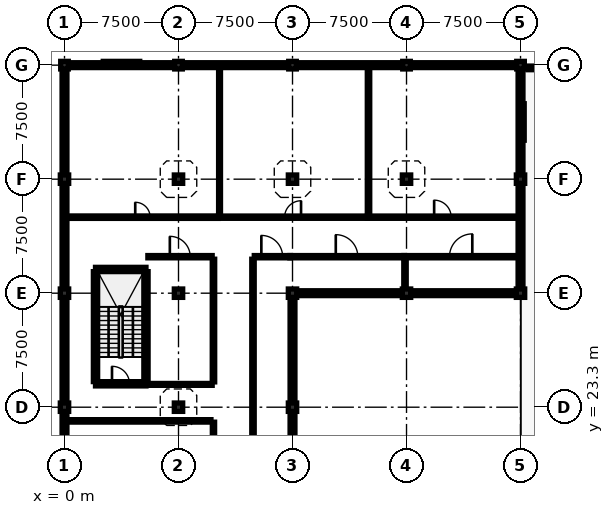
"""IFC4 building model, lengths in metres.
Left out: names, types, materials, properties, quantities, classifications, styles, units other than length and angle.
Written with IfcOpenShell. Run it as: python <this file> out.ifc"""

import sys

from ifc_helpers import new_model, si_unit, direction, frame, frame_2d, origin, origin_2d, place, context, subcontext, project, spatial, rectangle, extrude, element, fill, save


model = new_model("IFC4")
c1 = context("Model", 3, precision=1e-05, world=origin(), true_north=direction((0.0, 1.0)))
c2 = subcontext(c1, "Body", "Model", "MODEL_VIEW")
j1 = project(units=[si_unit("LENGTHUNIT", "METRE"), si_unit("PLANEANGLEUNIT", "RADIAN")], contexts=[c1])
p1 = place(None, origin())
s1 = spatial("IfcSite", under=j1, at=p1, CompositionType="ELEMENT")
p2 = place(p1, origin())
s2 = spatial("IfcBuilding", under=s1, at=p2, CompositionType="ELEMENT")
p3 = place(p2, frame((0.0, 0.0, 17.5)))
s3 = spatial("IfcBuildingStorey", under=s2, at=p3, CompositionType="ELEMENT", Elevation=17.5)
for number, where, z_axis, x_axis in (
    (1, (0.0, 23.3, 0.0), (0.0, 0.0, 1.0), (1.0, 0.0, 0.0)),
    (2, (0.0, 30.8, 0.0), (0.0, 0.0, 1.0), (1.0, 0.0, 0.0)),
    (3, (0.0, 38.3, 0.0), (0.0, 0.0, 1.0), (1.0, 0.0, 0.0)),
):
    element("IfcColumn", number, at=place(p3, frame(where, z_axis=z_axis, x_axis=x_axis)), inside=s3, PredefinedType="COLUMN", context=c2, shape_type="SweptSolid", body=[
        extrude(rectangle(XDim=0.55, YDim=0.55, at=origin_2d()), origin(), (0.0, 0.0, 1.0), 3.72),
    ])
p4 = place(p3, frame((0.0, 45.8, 0.0), z_axis=(0.0, 0.0, 1.0), x_axis=(1.0, 0.0, 0.0)))
e4 = element("IfcColumn", 4, at=p4, inside=s3, PredefinedType="COLUMN", context=c2, shape_type="SweptSolid", body=[
    extrude(rectangle(XDim=0.5, YDim=0.5, at=origin_2d()), origin(), (0.0, 0.0, 1.0), 5.156),
])
for number, where, z_axis, x_axis in (
    (5, (7.5, 23.3, 0.0), (0.0, 0.0, 1.0), (1.0, 0.0, 0.0)),
    (6, (7.5, 30.8, 0.0), (0.0, 0.0, 1.0), (1.0, 0.0, 0.0)),
    (7, (7.5, 38.3, 0.0), (0.0, 0.0, 1.0), (1.0, 0.0, 0.0)),
):
    element("IfcColumn", number, at=place(p3, frame(where, z_axis=z_axis, x_axis=x_axis)), inside=s3, PredefinedType="COLUMN", context=c2, shape_type="SweptSolid", body=[
        extrude(rectangle(XDim=0.55, YDim=0.55, at=origin_2d()), origin(), (0.0, 0.0, 1.0), 3.72),
    ])
p5 = place(p3, frame((7.5, 45.8, 0.0), z_axis=(0.0, 0.0, 1.0), x_axis=(1.0, 0.0, 0.0)))
e8 = element("IfcColumn", 8, at=p5, inside=s3, PredefinedType="COLUMN", context=c2, shape_type="SweptSolid", body=[
    extrude(rectangle(XDim=0.5, YDim=0.5, at=origin_2d()), origin(), (0.0, 0.0, 1.0), 5.156),
])
for number, where, z_axis, x_axis in (
    (9, (15.0, 23.3, 0.0), (0.0, 0.0, 1.0), (1.0, 0.0, 0.0)),
    (10, (15.0, 30.8, 0.0), (0.0, 0.0, 1.0), (1.0, 0.0, 0.0)),
    (11, (15.0, 38.3, 0.0), (0.0, 0.0, 1.0), (1.0, 0.0, 0.0)),
):
    element("IfcColumn", number, at=place(p3, frame(where, z_axis=z_axis, x_axis=x_axis)), inside=s3, PredefinedType="COLUMN", context=c2, shape_type="SweptSolid", body=[
        extrude(rectangle(XDim=0.55, YDim=0.55, at=origin_2d()), origin(), (0.0, 0.0, 1.0), 3.72),
    ])
p6 = place(p3, frame((15.0, 45.8, 0.0), z_axis=(0.0, 0.0, 1.0), x_axis=(1.0, 0.0, 0.0)))
e12 = element("IfcColumn", 12, at=p6, inside=s3, PredefinedType="COLUMN", context=c2, shape_type="SweptSolid", body=[
    extrude(rectangle(XDim=0.5, YDim=0.5, at=origin_2d()), origin(), (0.0, 0.0, 1.0), 3.72),
])
for number, where, z_axis, x_axis in (
    (13, (22.5, 30.8, 0.0), (0.0, 0.0, 1.0), (1.0, 0.0, 0.0)),
    (14, (22.5, 38.3, 0.0), (0.0, 0.0, 1.0), (1.0, 0.0, 0.0)),
):
    element("IfcColumn", number, at=place(p3, frame(where, z_axis=z_axis, x_axis=x_axis)), inside=s3, PredefinedType="COLUMN", context=c2, shape_type="SweptSolid", body=[
        extrude(rectangle(XDim=0.55, YDim=0.55, at=origin_2d()), origin(), (0.0, 0.0, 1.0), 3.75),
    ])
p7 = place(p3, frame((22.5, 45.8, 0.0), z_axis=(0.0, 0.0, 1.0), x_axis=(1.0, 0.0, 0.0)))
e15 = element("IfcColumn", 15, at=p7, inside=s3, PredefinedType="COLUMN", context=c2, shape_type="SweptSolid", body=[
    extrude(rectangle(XDim=0.5, YDim=0.5, at=origin_2d()), origin(), (0.0, 0.0, 1.0), 3.72),
])
for number, where, z_axis, x_axis in (
    (16, (30.0, 30.8, 0.0), (0.0, 0.0, 1.0), (1.0, 0.0, 0.0)),
    (17, (30.0, 38.3, 0.0), (0.0, 0.0, 1.0), (1.0, 0.0, 0.0)),
):
    element("IfcColumn", number, at=place(p3, frame(where, z_axis=z_axis, x_axis=x_axis)), inside=s3, PredefinedType="COLUMN", context=c2, shape_type="SweptSolid", body=[
        extrude(rectangle(XDim=0.55, YDim=0.55, at=origin_2d()), origin(), (0.0, 0.0, 1.0), 3.75),
    ])
p8 = place(p3, frame((30.0, 45.8, 0.0), z_axis=(0.0, 0.0, 1.0), x_axis=(1.0, 0.0, 0.0)))
e18 = element("IfcColumn", 18, at=p8, inside=s3, PredefinedType="COLUMN", context=c2, shape_type="SweptSolid", body=[
    extrude(rectangle(XDim=0.5, YDim=0.5, at=origin_2d()), origin(), (0.0, 0.0, 1.0), 3.72),
])
p9 = place(p3, frame((30.0, 45.55, 0.0), z_axis=(0.0, 0.0, 1.0), x_axis=(0.0, -1.0, 0.0)))
e19 = element("IfcWall", 19, at=p9, inside=s3, PredefinedType="SOLIDWALL", context=c2, shape_type="SweptSolid", body=[
    extrude(rectangle(XDim=6.975, YDim=0.32, at=frame_2d((3.488, 0.0))), origin(), (0.0, 0.0, 1.0), 3.085),
])
p10 = place(p3, frame((30.0, 38.025, 0.0), z_axis=(0.0, 0.0, 1.0), x_axis=(0.0, -1.0, 0.0)))
e20 = element("IfcWall", 20, at=p10, inside=s3, PredefinedType="SOLIDWALL", context=c2, shape_type="SweptSolid", body=[
    extrude(rectangle(XDim=6.95, YDim=0.32, at=frame_2d((3.475, 0.0))), origin(), (0.0, 0.0, 1.0), 3.085),
])
p11 = place(p3, frame((29.725, 30.8, 0.0), z_axis=(0.0, 0.0, 1.0), x_axis=(-1.0, 0.0, 0.0)))
e21 = element("IfcWall", 21, at=p11, inside=s3, PredefinedType="SOLIDWALL", context=c2, shape_type="SweptSolid", body=[
    extrude(rectangle(XDim=6.95, YDim=0.32, at=frame_2d((3.475, 0.0))), origin(), (0.0, 0.0, 1.0), 3.035),
])
p12 = place(p3, frame((22.225, 30.8, 0.0), z_axis=(0.0, 0.0, 1.0), x_axis=(-1.0, 0.0, 0.0)))
e22 = element("IfcWall", 22, at=p12, inside=s3, PredefinedType="SOLIDWALL", context=c2, shape_type="SweptSolid", body=[
    extrude(rectangle(XDim=6.95, YDim=0.32, at=frame_2d((3.475, 0.0))), origin(), (0.0, 0.0, 1.0), 3.005),
])
for number, where, z_axis, x_axis in (
    (23, (15.0, 30.525, 0.0), (0.0, 0.0, 1.0), (0.0, -1.0, 0.0)),
    (24, (15.0, 23.025, 0.0), (0.0, 0.0, 1.0), (0.0, -1.0, 0.0)),
    (25, (0.0, 16.075, 0.0), (0.0, 0.0, 1.0), (0.0, 1.0, 0.0)),
    (26, (0.0, 23.575, 0.0), (0.0, 0.0, 1.0), (0.0, 1.0, 0.0)),
):
    element("IfcWall", number, at=place(p3, frame(where, z_axis=z_axis, x_axis=x_axis)), inside=s3, PredefinedType="SOLIDWALL", context=c2, shape_type="SweptSolid", body=[
        extrude(rectangle(XDim=6.95, YDim=0.32, at=frame_2d((3.475, 0.0))), origin(), (0.0, 0.0, 1.0), 2.805),
    ])
p13 = place(p3, frame((0.0, 31.075, 0.0), z_axis=(0.0, 0.0, 1.0), x_axis=(0.0, 1.0, 0.0)))
e27 = element("IfcWall", 27, at=p13, inside=s3, PredefinedType="SOLIDWALL", context=c2, shape_type="SweptSolid", body=[
    extrude(rectangle(XDim=6.95, YDim=0.32, at=frame_2d((3.475, 0.0))), origin(), (0.0, 0.0, 1.0), 3.055),
])
p14 = place(p3, frame((0.0, 38.575, 0.0), z_axis=(0.0, 0.0, 1.0), x_axis=(0.0, 1.0, 0.0)))
e28 = element("IfcWall", 28, at=p14, inside=s3, PredefinedType="SOLIDWALL", context=c2, shape_type="SweptSolid", body=[
    extrude(rectangle(XDim=6.975, YDim=0.32, at=frame_2d((3.488, 0.0))), origin(), (0.0, 0.0, 1.0), 3.055),
])
p15 = place(p3, frame((0.25, 45.8, 0.0), z_axis=(0.0, 0.0, 1.0), x_axis=(1.0, 0.0, 0.0)))
e29 = element("IfcWall", 29, at=p15, inside=s3, PredefinedType="SOLIDWALL", context=c2, shape_type="SweptSolid", body=[
    extrude(rectangle(XDim=7.0, YDim=0.32, at=frame_2d((3.5, 0.0))), origin(), (0.0, 0.0, 1.0), 3.69),
])
p16 = place(p15, frame((2.8, 0.0, 0.9)))
e30 = element("IfcOpeningElement", 30, at=p16, cuts=e29, PredefinedType="OPENING", context=c2, shape_type="SweptSolid", body=[
    extrude(rectangle(XDim=1.4, YDim=1.9, at=frame_2d((0.7, 0.95))), frame((0.0, 0.172, 0.0), z_axis=(0.0, -1.0, 0.0), x_axis=(1.0, 0.0, 0.0)), (0.0, 0.0, 1.0), 0.344),
])
p17 = place(p3, frame((7.75, 45.8, 0.0), z_axis=(0.0, 0.0, 1.0), x_axis=(1.0, 0.0, 0.0)))
e31 = element("IfcWall", 31, at=p17, inside=s3, PredefinedType="SOLIDWALL", context=c2, shape_type="SweptSolid", body=[
    extrude(rectangle(XDim=7.0, YDim=0.32, at=frame_2d((3.5, 0.0))), origin(), (0.0, 0.0, 1.0), 3.69),
])
p18 = place(p3, frame((15.25, 45.8, 0.0), z_axis=(0.0, 0.0, 1.0), x_axis=(1.0, 0.0, 0.0)))
e32 = element("IfcWall", 32, at=p18, inside=s3, PredefinedType="SOLIDWALL", context=c2, shape_type="SweptSolid", body=[
    extrude(rectangle(XDim=7.0, YDim=0.32, at=frame_2d((3.5, 0.0))), origin(), (0.0, 0.0, 1.0), 3.7),
])
p19 = place(p3, frame((22.75, 45.8, 0.0), z_axis=(0.0, 0.0, 1.0), x_axis=(1.0, 0.0, 0.0)))
e33 = element("IfcWall", 33, at=p19, inside=s3, PredefinedType="SOLIDWALL", context=c2, shape_type="SweptSolid", body=[
    extrude(rectangle(XDim=7.0, YDim=0.32, at=frame_2d((3.5, 0.0))), origin(), (0.0, 0.0, 1.0), 3.7),
])
p20 = place(p19, frame((2.8, 0.0, 0.9)))
e34 = element("IfcOpeningElement", 34, at=p20, cuts=e33, PredefinedType="OPENING", context=c2, shape_type="SweptSolid", body=[
    extrude(rectangle(XDim=1.4, YDim=1.3, at=frame_2d((0.7, 0.65))), frame((0.0, 0.172, 0.0), z_axis=(0.0, -1.0, 0.0), x_axis=(1.0, 0.0, 0.0)), (0.0, 0.0, 1.0), 0.344),
])
p21 = place(p3, frame((30.5, 45.62, -0.08), z_axis=(0.0, 0.0, 1.0), x_axis=(1.0, 0.0, 0.0)))
e35 = element("IfcWall", 35, at=p21, inside=s3, PredefinedType="PARAPET", context=c2, shape_type="SweptSolid", body=[
    extrude(rectangle(XDim=6.52, YDim=0.24, at=frame_2d((3.26, 0.0))), origin(), (0.0, 0.0, 1.0), 0.6),
])
p22 = place(p3, frame((5.36, 24.985, 0.0), z_axis=(0.0, 0.0, 1.0), x_axis=(0.0, 1.0, 0.0)))
e36 = element("IfcWall", 36, at=p22, inside=s3, PredefinedType="SHEAR", context=c2, shape_type="SweptSolid", body=[
    extrude(rectangle(XDim=7.23, YDim=0.28, at=frame_2d((3.615, 0.0))), origin(), (0.0, 0.0, 1.0), 3.72),
])
p23 = place(p3, frame((5.36, 32.36, 0.0), z_axis=(0.0, 0.0, 1.0), x_axis=(-1.0, 0.0, 0.0)))
e37 = element("IfcWall", 37, at=p23, inside=s3, PredefinedType="SHEAR", context=c2, shape_type="SweptSolid", body=[
    extrude(rectangle(XDim=3.32, YDim=0.28, at=frame_2d((1.66, 0.0))), origin(), (0.0, 0.0, 1.0), 3.72),
])
p24 = place(p3, frame((2.04, 32.215, 0.0), z_axis=(0.0, 0.0, 1.0), x_axis=(0.0, -1.0, 0.0)))
e38 = element("IfcWall", 38, at=p24, inside=s3, PredefinedType="SHEAR", context=c2, shape_type="SweptSolid", body=[
    extrude(rectangle(XDim=7.23, YDim=0.28, at=frame_2d((3.615, 0.0))), origin(), (0.0, 0.0, 1.0), 3.72),
])
p25 = place(p3, frame((2.04, 24.84, 0.0), z_axis=(0.0, 0.0, 1.0), x_axis=(1.0, 0.0, 0.0)))
e39 = element("IfcWall", 39, at=p25, inside=s3, PredefinedType="SHEAR", context=c2, shape_type="SweptSolid", body=[
    extrude(rectangle(XDim=3.32, YDim=0.28, at=frame_2d((1.66, 0.0))), origin(), (0.0, 0.0, 1.0), 3.72),
])
p26 = place(p25, frame((1.085, 0.0, 0.0)))
e40 = element("IfcOpeningElement", 40, at=p26, cuts=e39, PredefinedType="OPENING", context=c2, shape_type="SweptSolid", body=[
    extrude(rectangle(XDim=1.15, YDim=2.15, at=frame_2d((0.575, 1.075))), frame((0.0, 0.152, 0.0), z_axis=(0.0, -1.0, 0.0), x_axis=(1.0, 0.0, 0.0)), (0.0, 0.0, 1.0), 0.304),
])
p27 = place(p3, frame((0.172, 35.8, 0.0), z_axis=(0.0, 0.0, 1.0), x_axis=(1.0, 0.0, 0.0)))
e41 = element("IfcWall", 41, at=p27, inside=s3, PredefinedType="PARTITIONING", context=c2, shape_type="SweptSolid", body=[
    extrude(rectangle(XDim=9.943, YDim=0.16, at=frame_2d((4.971, 0.0))), origin(), (0.0, 0.0, 1.0), 3.005),
])
p28 = place(p27, frame((4.481, 0.0, 0.0)))
e42 = element("IfcOpeningElement", 42, at=p28, cuts=e41, PredefinedType="OPENING", context=c2, shape_type="SweptSolid", body=[
    extrude(rectangle(XDim=0.98, YDim=2.12, at=frame_2d((0.49, 1.06))), frame((0.0, 0.092, 0.0), z_axis=(0.0, -1.0, 0.0), x_axis=(1.0, 0.0, 0.0)), (0.0, 0.0, 1.0), 0.184),
])
p29 = place(p3, frame((10.127, 35.8, 0.0), z_axis=(0.0, 0.0, 1.0), x_axis=(1.0, 0.0, 0.0)))
e43 = element("IfcWall", 43, at=p29, inside=s3, PredefinedType="PARTITIONING", context=c2, shape_type="SweptSolid", body=[
    extrude(rectangle(XDim=9.788, YDim=0.15, at=frame_2d((4.894, 0.0))), origin(), (0.0, 0.0, 1.0), 3.005),
])
p30 = place(p29, frame((4.354, 0.0, 0.0)))
e44 = element("IfcOpeningElement", 44, at=p30, cuts=e43, PredefinedType="OPENING", context=c2, shape_type="SweptSolid", body=[
    extrude(rectangle(XDim=1.08, YDim=2.18, at=frame_2d((0.54, 1.09))), frame((0.0, 0.087, 0.0), z_axis=(0.0, -1.0, 0.0), x_axis=(1.0, 0.0, 0.0)), (0.0, 0.0, 1.0), 0.174),
])
p31 = place(p3, frame((19.927, 35.8, 0.0), z_axis=(0.0, 0.0, 1.0), x_axis=(1.0, 0.0, 0.0)))
e45 = element("IfcWall", 45, at=p31, inside=s3, PredefinedType="PARTITIONING", context=c2, shape_type="SweptSolid", body=[
    extrude(rectangle(XDim=9.901, YDim=0.15, at=frame_2d((4.95, 0.0))), origin(), (0.0, 0.0, 1.0), 3.035),
])
p32 = place(p31, frame((4.39, 0.0, 0.0)))
e46 = element("IfcOpeningElement", 46, at=p32, cuts=e45, PredefinedType="OPENING", context=c2, shape_type="SweptSolid", body=[
    extrude(rectangle(XDim=1.12, YDim=2.2, at=frame_2d((0.56, 1.1))), frame((0.0, 0.087, 0.0), z_axis=(0.0, -1.0, 0.0), x_axis=(1.0, 0.0, 0.0)), (0.0, 0.0, 1.0), 0.174),
])
p33 = place(p3, frame((9.8, 15.127, 0.0), z_axis=(0.0, 0.0, 1.0), x_axis=(0.0, 1.0, 0.0)))
e47 = element("IfcWall", 47, at=p33, inside=s3, PredefinedType="PARTITIONING", context=c2, shape_type="SweptSolid", body=[
    extrude(rectangle(XDim=7.188, YDim=0.15, at=frame_2d((3.594, 0.0))), origin(), (0.0, 0.0, 1.0), 2.805),
])
p34 = place(p33, frame((2.954, 0.0, 0.0)))
e48 = element("IfcOpeningElement", 48, at=p34, cuts=e47, PredefinedType="OPENING", context=c2, shape_type="SweptSolid", body=[
    extrude(rectangle(XDim=1.28, YDim=2.22, at=frame_2d((0.64, 1.11))), frame((0.0, 0.087, 0.0), z_axis=(0.0, -1.0, 0.0), x_axis=(1.0, 0.0, 0.0)), (0.0, 0.0, 1.0), 0.174),
])
p35 = place(p3, frame((5.485, 33.2, 0.0), z_axis=(0.0, 0.0, 1.0), x_axis=(1.0, 0.0, 0.0)))
e49 = element("IfcWall", 49, at=p35, inside=s3, PredefinedType="PARTITIONING", context=c2, shape_type="SweptSolid", body=[
    extrude(rectangle(XDim=4.23, YDim=0.15, at=frame_2d((2.115, 0.0))), origin(), (0.0, 0.0, 1.0), 3.005),
])
p36 = place(p35, frame((1.445, 0.0, 0.0)))
e50 = element("IfcOpeningElement", 50, at=p36, cuts=e49, PredefinedType="OPENING", context=c2, shape_type="SweptSolid", body=[
    extrude(rectangle(XDim=1.34, YDim=2.24, at=frame_2d((0.67, 1.12))), frame((0.0, 0.087, 0.0), z_axis=(0.0, -1.0, 0.0), x_axis=(1.0, 0.0, 0.0)), (0.0, 0.0, 1.0), 0.174),
])
p37 = place(p3, frame((12.485, 33.2, 0.0), z_axis=(0.0, 0.0, 1.0), x_axis=(1.0, 0.0, 0.0)))
e51 = element("IfcWall", 51, at=p37, inside=s3, PredefinedType="PARTITIONING", context=c2, shape_type="SweptSolid", body=[
    extrude(rectangle(XDim=2.33, YDim=0.15, at=frame_2d((1.165, 0.0))), origin(), (0.0, 0.0, 1.0), 3.005),
])
p38 = place(p37, frame((0.465, 0.0, 0.0)))
e52 = element("IfcOpeningElement", 52, at=p38, cuts=e51, PredefinedType="OPENING", context=c2, shape_type="SweptSolid", body=[
    extrude(rectangle(XDim=1.4, YDim=2.25, at=frame_2d((0.7, 1.125))), frame((0.0, 0.087, 0.0), z_axis=(0.0, -1.0, 0.0), x_axis=(1.0, 0.0, 0.0)), (0.0, 0.0, 1.0), 0.174),
])
p39 = place(p3, frame((14.827, 33.2, 0.0), z_axis=(0.0, 0.0, 1.0), x_axis=(1.0, 0.0, 0.0)))
e53 = element("IfcWall", 53, at=p39, inside=s3, PredefinedType="PARTITIONING", context=c2, shape_type="SweptSolid", body=[
    extrude(rectangle(XDim=7.488, YDim=0.15, at=frame_2d((3.744, 0.0))), origin(), (0.0, 0.0, 1.0), 3.005),
])
p40 = place(p39, frame((3.019, 0.0, 0.0)))
e54 = element("IfcOpeningElement", 54, at=p40, cuts=e53, PredefinedType="OPENING", context=c2, shape_type="SweptSolid", body=[
    extrude(rectangle(XDim=1.45, YDim=2.26, at=frame_2d((0.725, 1.13))), frame((0.0, 0.087, 0.0), z_axis=(0.0, -1.0, 0.0), x_axis=(1.0, 0.0, 0.0)), (0.0, 0.0, 1.0), 0.174),
])
p41 = place(p3, frame((22.327, 33.2, 0.0), z_axis=(0.0, 0.0, 1.0), x_axis=(1.0, 0.0, 0.0)))
e55 = element("IfcWall", 55, at=p41, inside=s3, PredefinedType="PARTITIONING", context=c2, shape_type="SweptSolid", body=[
    extrude(rectangle(XDim=7.501, YDim=0.15, at=frame_2d((3.75, 0.0))), origin(), (0.0, 0.0, 1.0), 3.035),
])
p42 = place(p41, frame((3.0, 0.0, 0.0)))
e56 = element("IfcOpeningElement", 56, at=p42, cuts=e55, PredefinedType="OPENING", context=c2, shape_type="SweptSolid", body=[
    extrude(rectangle(XDim=1.5, YDim=2.28, at=frame_2d((0.75, 1.14))), frame((0.0, 0.087, 0.0), z_axis=(0.0, -1.0, 0.0), x_axis=(1.0, 0.0, 0.0)), (0.0, 0.0, 1.0), 0.174),
])
p43 = place(p3, frame((5.372, 24.8, 0.0), z_axis=(0.0, 0.0, 1.0), x_axis=(1.0, 0.0, 0.0)))
e57 = element("IfcWall", 57, at=p43, inside=s3, PredefinedType="PARTITIONING", context=c2, shape_type="SweptSolid", body=[
    extrude(rectangle(XDim=4.343, YDim=0.125, at=frame_2d((2.171, 0.0))), origin(), (0.0, 0.0, 1.0), 2.805),
])
p44 = place(p3, frame((10.2, 35.887, 0.0), z_axis=(0.0, 0.0, 1.0), x_axis=(0.0, 1.0, 0.0)))
e58 = element("IfcWall", 58, at=p44, inside=s3, PredefinedType="PARTITIONING", context=c2, shape_type="SweptSolid", body=[
    extrude(rectangle(XDim=9.741, YDim=0.125, at=frame_2d((4.871, 0.0))), origin(), (0.0, 0.0, 1.0), 3.055),
])
p45 = place(p3, frame((20.0, 35.887, 0.0), z_axis=(0.0, 0.0, 1.0), x_axis=(0.0, 1.0, 0.0)))
e59 = element("IfcWall", 59, at=p45, inside=s3, PredefinedType="PARTITIONING", context=c2, shape_type="SweptSolid", body=[
    extrude(rectangle(XDim=9.741, YDim=0.16, at=frame_2d((4.871, 0.0))), origin(), (0.0, 0.0, 1.0), 3.055),
])
p46 = place(p3, frame((0.172, 22.4, 0.0), z_axis=(0.0, 0.0, 1.0), x_axis=(1.0, 0.0, 0.0)))
e60 = element("IfcWall", 60, at=p46, inside=s3, PredefinedType="PARTITIONING", context=c2, shape_type="SweptSolid", body=[
    extrude(rectangle(XDim=9.463, YDim=0.16, at=frame_2d((4.731, 0.0))), origin(), (0.0, 0.0, 1.0), 2.805),
])
p47 = place(p3, frame((9.8, 24.965, 0.0), z_axis=(0.0, 0.0, 1.0), x_axis=(0.0, 1.0, 0.0)))
e61 = element("IfcWall", 61, at=p47, inside=s3, PredefinedType="PARTITIONING", context=c2, shape_type="SweptSolid", body=[
    extrude(rectangle(XDim=8.07, YDim=0.16, at=frame_2d((4.035, 0.0))), origin(), (0.0, 0.0, 1.0), 3.005),
])
p48 = place(p3, frame((12.4, 15.965, 0.0), z_axis=(0.0, 0.0, 1.0), x_axis=(0.0, 1.0, 0.0)))
e62 = element("IfcWall", 62, at=p48, inside=s3, PredefinedType="PARTITIONING", context=c2, shape_type="SweptSolid", body=[
    extrude(rectangle(XDim=17.07, YDim=0.16, at=frame_2d((8.535, 0.0))), origin(), (0.0, 0.0, 1.0), 2.805),
])
p49 = place(p3, frame((22.4, 31.087, 0.0), z_axis=(0.0, 0.0, 1.0), x_axis=(0.0, 1.0, 0.0)))
e63 = element("IfcWall", 63, at=p49, inside=s3, PredefinedType="PARTITIONING", context=c2, shape_type="SweptSolid", body=[
    extrude(rectangle(XDim=2.026, YDim=0.16, at=frame_2d((1.013, 0.0))), origin(), (0.0, 0.0, 1.0), 3.035),
])
p50 = place(p16, origin())
e64 = element("IfcWindow", 64, at=p50, inside=s3, PartitioningType="SINGLE_PANEL", PredefinedType="WINDOW", context=c2, shape_type="SweptSolid", body=[
    extrude(rectangle(XDim=1.4, YDim=1.9, at=frame_2d((0.7, 0.95))), frame((0.0, 0.03, 0.0), z_axis=(0.0, -1.0, 0.0), x_axis=(1.0, 0.0, 0.0)), (0.0, 0.0, 1.0), 0.06),
])
fill(e30, e64)
p51 = place(p20, origin())
e65 = element("IfcWindow", 65, at=p51, inside=s3, PartitioningType="SINGLE_PANEL", PredefinedType="WINDOW", context=c2, shape_type="SweptSolid", body=[
    extrude(rectangle(XDim=1.4, YDim=1.3, at=frame_2d((0.7, 0.65))), frame((0.0, 0.03, 0.0), z_axis=(0.0, -1.0, 0.0), x_axis=(1.0, 0.0, 0.0)), (0.0, 0.0, 1.0), 0.06),
])
fill(e34, e65)
p52 = place(p26, origin())
e66 = element("IfcDoor", 66, at=p52, inside=s3, OperationType="SINGLE_SWING_LEFT", PredefinedType="DOOR", context=c2, shape_type="SweptSolid", body=[
    extrude(rectangle(XDim=1.15, YDim=2.15, at=frame_2d((0.575, 1.075))), frame((0.0, 0.025, 0.0), z_axis=(0.0, -1.0, 0.0), x_axis=(1.0, 0.0, 0.0)), (0.0, 0.0, 1.0), 0.05),
])
fill(e40, e66)
p53 = place(p28, origin())
e67 = element("IfcDoor", 67, at=p53, inside=s3, OperationType="SINGLE_SWING_LEFT", PredefinedType="DOOR", context=c2, shape_type="SweptSolid", body=[
    extrude(rectangle(XDim=0.98, YDim=2.12, at=frame_2d((0.49, 1.06))), frame((0.0, 0.025, 0.0), z_axis=(0.0, -1.0, 0.0), x_axis=(1.0, 0.0, 0.0)), (0.0, 0.0, 1.0), 0.05),
])
fill(e42, e67)
p54 = place(p30, origin())
e68 = element("IfcDoor", 68, at=p54, inside=s3, OperationType="SINGLE_SWING_RIGHT", PredefinedType="DOOR", context=c2, shape_type="SweptSolid", body=[
    extrude(rectangle(XDim=1.08, YDim=2.18, at=frame_2d((0.54, 1.09))), frame((0.0, 0.025, 0.0), z_axis=(0.0, -1.0, 0.0), x_axis=(1.0, 0.0, 0.0)), (0.0, 0.0, 1.0), 0.05),
])
fill(e44, e68)
p55 = place(p32, origin())
e69 = element("IfcDoor", 69, at=p55, inside=s3, OperationType="SINGLE_SWING_LEFT", PredefinedType="DOOR", context=c2, shape_type="SweptSolid", body=[
    extrude(rectangle(XDim=1.12, YDim=2.2, at=frame_2d((0.56, 1.1))), frame((0.0, 0.025, 0.0), z_axis=(0.0, -1.0, 0.0), x_axis=(1.0, 0.0, 0.0)), (0.0, 0.0, 1.0), 0.05),
])
fill(e46, e69)
p56 = place(p36, origin())
e70 = element("IfcDoor", 70, at=p56, inside=s3, OperationType="SINGLE_SWING_LEFT", PredefinedType="DOOR", context=c2, shape_type="SweptSolid", body=[
    extrude(rectangle(XDim=1.34, YDim=2.24, at=frame_2d((0.67, 1.12))), frame((0.0, 0.025, 0.0), z_axis=(0.0, -1.0, 0.0), x_axis=(1.0, 0.0, 0.0)), (0.0, 0.0, 1.0), 0.05),
])
fill(e50, e70)
p57 = place(p38, origin())
e71 = element("IfcDoor", 71, at=p57, inside=s3, OperationType="SINGLE_SWING_LEFT", PredefinedType="DOOR", context=c2, shape_type="SweptSolid", body=[
    extrude(rectangle(XDim=1.4, YDim=2.25, at=frame_2d((0.7, 1.125))), frame((0.0, 0.025, 0.0), z_axis=(0.0, -1.0, 0.0), x_axis=(1.0, 0.0, 0.0)), (0.0, 0.0, 1.0), 0.05),
])
fill(e52, e71)
p58 = place(p40, origin())
e72 = element("IfcDoor", 72, at=p58, inside=s3, OperationType="SINGLE_SWING_LEFT", PredefinedType="DOOR", context=c2, shape_type="SweptSolid", body=[
    extrude(rectangle(XDim=1.45, YDim=2.26, at=frame_2d((0.725, 1.13))), frame((0.0, 0.025, 0.0), z_axis=(0.0, -1.0, 0.0), x_axis=(1.0, 0.0, 0.0)), (0.0, 0.0, 1.0), 0.05),
])
fill(e54, e72)
p59 = place(p42, origin())
e73 = element("IfcDoor", 73, at=p59, inside=s3, OperationType="SINGLE_SWING_RIGHT", PredefinedType="DOOR", context=c2, shape_type="SweptSolid", body=[
    extrude(rectangle(XDim=1.5, YDim=2.28, at=frame_2d((0.75, 1.14))), frame((0.0, 0.025, 0.0), z_axis=(0.0, -1.0, 0.0), x_axis=(1.0, 0.0, 0.0)), (0.0, 0.0, 1.0), 0.05),
])
fill(e56, e73)
save(model, sys.argv[1])
